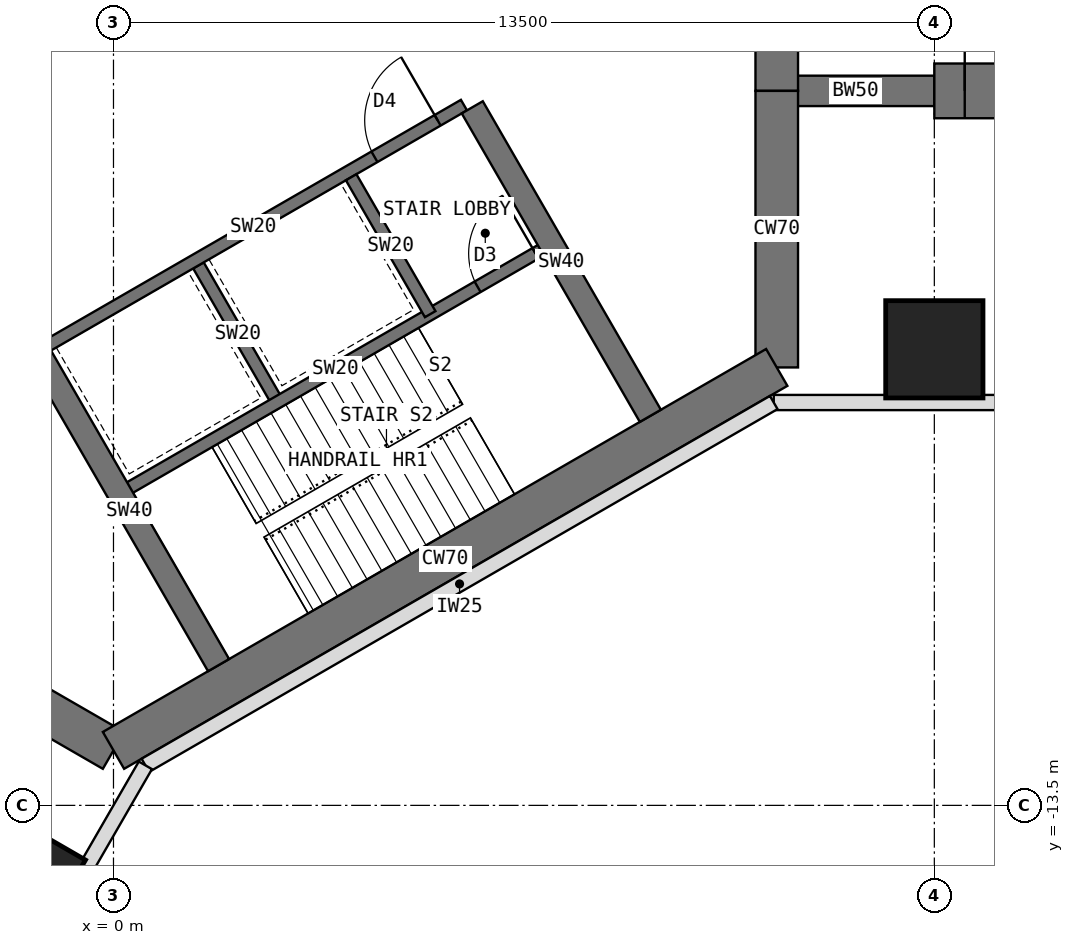
"""IFC4 building model, lengths in metres.
Left out: names, types, materials, properties, quantities, classifications, styles, units other than length and angle.
Written with IfcOpenShell. Run it as: python <this file> out.ifc"""

import sys

from ifc_helpers import new_model, si_unit, direction, frame, frame_2d, origin, origin_2d, place, context, subcontext, project, spatial, rectangle, extrude, element, fill, save


model = new_model("IFC4")
c1 = context("Model", 3, precision=1e-05, world=origin(), true_north=direction((0.0, 1.0)))
c2 = subcontext(c1, "Body", "Model", "MODEL_VIEW")
j1 = project(units=[si_unit("LENGTHUNIT", "METRE"), si_unit("PLANEANGLEUNIT", "RADIAN")], contexts=[c1])
p1 = place(None, origin())
s1 = spatial("IfcSite", under=j1, at=p1, CompositionType="ELEMENT")
p2 = place(p1, origin())
s2 = spatial("IfcBuilding", under=s1, at=p2, CompositionType="ELEMENT")
p3 = place(p2, origin())
s3 = spatial("IfcBuildingStorey", under=s2, at=p3, CompositionType="ELEMENT", Elevation=0.0)
p4 = place(p3, frame((13.5, -13.5, 0.0), z_axis=(0.0, 0.0, 1.0), x_axis=(1.0, 0.0, 0.0)))
e1 = element("IfcColumn", 1, at=p4, inside=s3, PredefinedType="COLUMN", context=c2, shape_type="SweptSolid", body=[
    extrude(rectangle(XDim=1.5, YDim=1.5, at=origin_2d()), origin(), (0.0, 0.0, 1.0), 5.5),
])
p5 = place(p3, frame((10.908, -6.298, 0.0), z_axis=(0.0, 0.0, 1.0), x_axis=(0.0, 1.0, 0.0)))
e2 = element("IfcWall", 2, at=p5, inside=s3, PredefinedType="SHEAR", context=c2, shape_type="SweptSolid", body=[
    extrude(rectangle(XDim=4.548, YDim=0.7, at=frame_2d((2.274, 0.0))), origin(), (0.0, 0.0, 1.0), 5.5),
])
p6 = place(p3, frame((10.908, -1.75, 0.0), z_axis=(0.0, 0.0, 1.0), x_axis=(0.0, 1.0, 0.0)))
e3 = element("IfcWall", 3, at=p6, inside=s3, PredefinedType="SHEAR", context=c2, shape_type="SweptSolid", body=[
    extrude(rectangle(XDim=3.5, YDim=0.7, at=frame_2d((1.75, 0.0))), origin(), (0.0, 0.0, 1.0), 5.5),
])
p7 = place(p6, frame((0.85, 0.0, 0.0)))
e4 = element("IfcOpeningElement", 4, at=p7, cuts=e3, PredefinedType="OPENING", context=c2, shape_type="SweptSolid", body=[
    extrude(rectangle(XDim=1.8, YDim=2.1, at=frame_2d((0.9, 1.05))), frame((0.0, 0.36, 0.0), z_axis=(0.0, -1.0, 0.0), x_axis=(1.0, 0.0, 0.0)), (0.0, 0.0, 1.0), 0.72),
])
p8 = place(p3, frame((-3.939, -10.322, 0.0), z_axis=(0.0, 0.0, 1.0), x_axis=(0.866011268655, -0.500024481964, 0.0)))
e5 = element("IfcWall", 5, at=p8, inside=s3, PredefinedType="SHEAR", context=c2, shape_type="SweptSolid", body=[
    extrude(rectangle(XDim=4.548, YDim=0.7, at=frame_2d((2.274, 0.0))), origin(), (0.0, 0.0, 1.0), 5.5),
])
p9 = place(p3, frame((0.0, -12.596, 0.0), z_axis=(0.0, 0.0, 1.0), x_axis=(0.866021940709, 0.500005998175, 0.0)))
e6 = element("IfcWall", 6, at=p9, inside=s3, PredefinedType="SHEAR", context=c2, shape_type="SweptSolid", body=[
    extrude(rectangle(XDim=12.596, YDim=0.7, at=frame_2d((6.298, 0.0))), origin(), (0.0, 0.0, 1.0), 5.5),
])
p10 = place(p3, frame((10.908, -1.75, 0.0), z_axis=(0.0, 0.0, 1.0), x_axis=(1.0, 0.0, 0.0)))
e7 = element("IfcWall", 7, at=p10, inside=s3, PredefinedType="SHEAR", context=c2, shape_type="SweptSolid", body=[
    extrude(rectangle(XDim=2.592, YDim=0.5, at=frame_2d((1.296, 0.0))), origin(), (0.0, 0.0, 1.0), 5.5),
])
p11 = place(p3, frame((13.5, -1.75, 0.0), z_axis=(0.0, 0.0, 1.0), x_axis=(1.0, 0.0, 0.0)))
e8 = element("IfcWall", 8, at=p11, inside=s3, PredefinedType="SHEAR", context=c2, shape_type="SweptSolid", body=[
    extrude(rectangle(XDim=13.2, YDim=0.9, at=frame_2d((6.6, 0.0))), origin(), (0.0, 0.0, 1.0), 5.5),
])
p12 = place(p11, frame((0.5, 0.0, 0.0)))
e9 = element("IfcOpeningElement", 9, at=p12, cuts=e8, PredefinedType="OPENING", context=c2, shape_type="SweptSolid", body=[
    extrude(rectangle(XDim=1.0, YDim=2.1, at=frame_2d((0.5, 1.05))), frame((0.0, 0.46, 0.0), z_axis=(0.0, -1.0, 0.0), x_axis=(1.0, 0.0, 0.0)), (0.0, 0.0, 1.0), 0.92),
])
for number, where, z_axis, x_axis in (
    (10, (13.5, -6.0, 0.0), (0.0, 0.0, 1.0), (1.0, 0.0, 0.0)),
    (11, (-1.554, -14.691, 0.0), (0.0, 0.0, 1.0), (0.5, 0.866, 0.0)),
):
    element("IfcColumn", number, at=place(p3, frame(where, z_axis=z_axis, x_axis=x_axis)), inside=s3, PredefinedType="COLUMN", context=c2, shape_type="SweptSolid", body=[
        extrude(rectangle(XDim=1.6, YDim=1.6, at=origin_2d()), origin(), (0.0, 0.0, 1.0), 5.5),
    ])
p13 = place(p3, frame((-1.164, -5.984, 0.0), z_axis=(0.0, 0.0, 1.0), x_axis=(0.866026010844, 0.49999894854, 0.0)))
e12 = element("IfcWall", 12, at=p13, inside=s3, PredefinedType="SHEAR", context=c2, shape_type="SweptSolid", body=[
    extrude(rectangle(XDim=8.0, YDim=0.2, at=frame_2d((4.0, 0.0))), origin(), (0.0, 0.0, 1.0), 5.5),
])
p14 = place(p13, frame((6.3, 0.0, 0.0)))
e13 = element("IfcOpeningElement", 13, at=p14, cuts=e12, PredefinedType="OPENING", context=c2, shape_type="SweptSolid", body=[
    extrude(rectangle(XDim=1.2, YDim=2.1, at=frame_2d((0.6, 1.05))), frame((0.0, 0.11, 0.0), z_axis=(0.0, -1.0, 0.0), x_axis=(1.0, 0.0, 0.0)), (0.0, 0.0, 1.0), 0.22),
])
p15 = place(p3, frame((1.397, -4.62, 0.0), z_axis=(0.0, 0.0, 1.0), x_axis=(0.499936506574, -0.866062058628, 0.0)))
e14 = element("IfcWall", 14, at=p15, inside=s3, PredefinedType="SHEAR", context=c2, shape_type="SweptSolid", body=[
    extrude(rectangle(XDim=2.6, YDim=0.2, at=frame_2d((1.3, 0.0))), origin(), (0.0, 0.0, 1.0), 5.5),
])
p16 = place(p3, frame((3.909, -3.17, 0.0), z_axis=(0.0, 0.0, 1.0), x_axis=(0.49997716683, -0.86603858612, 0.0)))
e15 = element("IfcWall", 15, at=p16, inside=s3, PredefinedType="SHEAR", context=c2, shape_type="SweptSolid", body=[
    extrude(rectangle(XDim=2.6, YDim=0.2, at=frame_2d((1.3, 0.0))), origin(), (0.0, 0.0, 1.0), 5.5),
])
p17 = place(p3, frame((0.186, -8.322, 0.0), z_axis=(0.0, 0.0, 1.0), x_axis=(0.866026010844, 0.49999894854, 0.0)))
e16 = element("IfcWall", 16, at=p17, inside=s3, PredefinedType="SHEAR", context=c2, shape_type="SweptSolid", body=[
    extrude(rectangle(XDim=8.0, YDim=0.2, at=frame_2d((4.0, 0.0))), origin(), (0.0, 0.0, 1.0), 5.5),
])
p18 = place(p17, frame((6.7, 0.0, 0.0)))
e17 = element("IfcOpeningElement", 17, at=p18, cuts=e16, PredefinedType="OPENING", context=c2, shape_type="SweptSolid", body=[
    extrude(rectangle(XDim=1.1, YDim=2.1, at=frame_2d((0.55, 1.05))), frame((0.0, 0.11, 0.0), z_axis=(0.0, -1.0, 0.0), x_axis=(1.0, 0.0, 0.0)), (0.0, 0.0, 1.0), 0.22),
])
for number, where, z_axis, x_axis in (
    (18, (5.901, -2.02, 0.0), (0.0, 0.0, 1.0), (0.5, -0.866, 0.0)),
    (19, (-1.201, -6.12, 0.0), (0.0, 0.0, 1.0), (0.5, -0.866, 0.0)),
):
    element("IfcWall", number, at=place(p3, frame(where, z_axis=z_axis, x_axis=x_axis)), inside=s3, PredefinedType="SHEAR", context=c2, shape_type="SweptSolid", body=[
        extrude(rectangle(XDim=5.858, YDim=0.4, at=frame_2d((2.929, 0.0))), origin(), (0.0, 0.0, 1.0), 5.5),
    ])
p19 = place(p3, frame((0.0, -14.1, 0.0), z_axis=(0.0, 0.0, 1.0), x_axis=(0.0, -1.0, 0.0)))
e20 = element("IfcWall", 20, at=p19, inside=s3, PredefinedType="PARTITIONING", context=c2, shape_type="SweptSolid", body=[
    extrude(rectangle(XDim=12.9, YDim=0.2, at=frame_2d((6.45, 0.0))), origin(), (0.0, 0.0, 1.0), 5.15),
])
p20 = place(p19, frame((0.55, 0.0, 0.0)))
e21 = element("IfcOpeningElement", 21, at=p20, cuts=e20, PredefinedType="OPENING", context=c2, shape_type="SweptSolid", body=[
    extrude(rectangle(XDim=1.8, YDim=2.4, at=frame_2d((0.9, 1.2))), frame((0.0, 0.11, 0.0), z_axis=(0.0, -1.0, 0.0), x_axis=(1.0, 0.0, 0.0)), (0.0, 0.0, 1.0), 0.22),
])
p21 = place(p3, frame((0.346, -13.5, 0.0), z_axis=(0.0, 0.0, 1.0), x_axis=(1.0, 0.0, 0.0)))
e22 = element("IfcWall", 22, at=p21, inside=s3, PredefinedType="PARTITIONING", context=c2, shape_type="SweptSolid", body=[
    extrude(rectangle(XDim=13.154, YDim=0.2, at=frame_2d((6.577, 0.0))), origin(), (0.0, 0.0, 1.0), 5.15),
])
p22 = place(p21, frame((5.677, 0.0, 0.0)))
e23 = element("IfcOpeningElement", 23, at=p22, cuts=e22, PredefinedType="OPENING", context=c2, shape_type="SweptSolid", body=[
    extrude(rectangle(XDim=1.8, YDim=2.4, at=frame_2d((0.9, 1.2))), frame((0.0, 0.11, 0.0), z_axis=(0.0, -1.0, 0.0), x_axis=(1.0, 0.0, 0.0)), (0.0, 0.0, 1.0), 0.22),
])
p23 = place(p3, frame((13.5, -13.5, 0.0), z_axis=(0.0, 0.0, 1.0), x_axis=(0.0, 1.0, 0.0)))
e24 = element("IfcWall", 24, at=p23, inside=s3, PredefinedType="PARTITIONING", context=c2, shape_type="SweptSolid", body=[
    extrude(rectangle(XDim=6.45, YDim=0.2, at=frame_2d((3.225, 0.0))), origin(), (0.0, 0.0, 1.0), 5.15),
])
p24 = place(p3, frame((13.5, -13.5, 0.0), z_axis=(0.0, 0.0, 1.0), x_axis=(1.0, 0.0, 0.0)))
e25 = element("IfcWall", 25, at=p24, inside=s3, PredefinedType="PARTITIONING", context=c2, shape_type="SweptSolid", body=[
    extrude(rectangle(XDim=13.5, YDim=0.2, at=frame_2d((6.75, 0.0))), origin(), (0.0, 0.0, 1.0), 3.75),
])
p25 = place(p24, frame((5.85, 0.0, 0.0)))
e26 = element("IfcOpeningElement", 26, at=p25, cuts=e25, PredefinedType="OPENING", context=c2, shape_type="SweptSolid", body=[
    extrude(rectangle(XDim=1.8, YDim=2.4, at=frame_2d((0.9, 1.2))), frame((0.0, 0.11, 0.0), z_axis=(0.0, -1.0, 0.0), x_axis=(1.0, 0.0, 0.0)), (0.0, 0.0, 1.0), 0.22),
])
p26 = place(p3, frame((24.875, -6.875, 0.0), z_axis=(0.0, 0.0, 1.0), x_axis=(-1.0, 0.0, 0.0)))
e27 = element("IfcWall", 27, at=p26, inside=s3, PredefinedType="STANDARD", context=c2, shape_type="SweptSolid", body=[
    extrude(rectangle(XDim=14.016, YDim=0.25, at=frame_2d((7.008, 0.0))), origin(), (0.0, 0.0, 1.0), 5.15),
])
p27 = place(p3, frame((10.859, -6.875, 0.0), z_axis=(0.0, 0.0, 1.0), x_axis=(-0.866027502425, -0.499996365031, 0.0)))
e28 = element("IfcWall", 28, at=p27, inside=s3, PredefinedType="STANDARD", context=c2, shape_type="SweptSolid", body=[
    extrude(rectangle(XDim=11.933, YDim=0.25, at=frame_2d((5.967, 0.0))), origin(), (0.0, 0.0, 1.0), 5.15),
])
p28 = place(p3, frame((0.524, -12.842, 0.0), z_axis=(0.0, 0.0, 1.0), x_axis=(-0.499996367808, -0.866027500821, 0.0)))
e29 = element("IfcWall", 29, at=p28, inside=s3, PredefinedType="STANDARD", context=c2, shape_type="SweptSolid", body=[
    extrude(rectangle(XDim=14.016, YDim=0.25, at=frame_2d((7.008, 0.0))), origin(), (0.0, 0.0, 1.0), 5.15),
])
p29 = place(p14, origin())
e30 = element("IfcDoor", 30, at=p29, inside=s3, OperationType="SINGLE_SWING_RIGHT", PredefinedType="DOOR", context=c2, shape_type="SweptSolid", body=[
    extrude(rectangle(XDim=1.2, YDim=2.1, at=frame_2d((0.6, 1.05))), frame((0.0, 0.025, 0.0), z_axis=(0.0, -1.0, 0.0), x_axis=(1.0, 0.0, 0.0)), (0.0, 0.0, 1.0), 0.05),
])
fill(e13, e30)
p30 = place(p18, origin())
e31 = element("IfcDoor", 31, at=p30, inside=s3, OperationType="SINGLE_SWING_RIGHT", PredefinedType="DOOR", context=c2, shape_type="SweptSolid", body=[
    extrude(rectangle(XDim=1.1, YDim=2.1, at=frame_2d((0.55, 1.05))), frame((0.0, 0.025, 0.0), z_axis=(0.0, -1.0, 0.0), x_axis=(1.0, 0.0, 0.0)), (0.0, 0.0, 1.0), 0.05),
])
fill(e17, e31)
p31 = place(p12, origin())
e32 = element("IfcDoor", 32, at=p31, inside=s3, OperationType="SINGLE_SWING_LEFT", PredefinedType="DOOR", context=c2, shape_type="SweptSolid", body=[
    extrude(rectangle(XDim=0.92, YDim=2.06, at=frame_2d((0.5, 1.03))), frame((0.0, 0.025, 0.0), z_axis=(0.0, -1.0, 0.0), x_axis=(1.0, 0.0, 0.0)), (0.0, 0.0, 1.0), 0.05),
    extrude(rectangle(XDim=0.04, YDim=2.1, at=frame_2d((0.02, 1.05))), frame((0.0, 0.45, 0.0), z_axis=(0.0, -1.0, 0.0), x_axis=(1.0, 0.0, 0.0)), (0.0, 0.0, 1.0), 0.899),
    extrude(rectangle(XDim=0.04, YDim=2.1, at=frame_2d((0.98, 1.05))), frame((0.0, 0.45, 0.0), z_axis=(0.0, -1.0, 0.0), x_axis=(1.0, 0.0, 0.0)), (0.0, 0.0, 1.0), 0.899),
    extrude(rectangle(XDim=0.92, YDim=0.04, at=frame_2d((0.5, 2.08))), frame((0.0, 0.45, 0.0), z_axis=(0.0, -1.0, 0.0), x_axis=(1.0, 0.0, 0.0)), (0.0, 0.0, 1.0), 0.899),
])
fill(e9, e32)
p32 = place(p22, origin())
e33 = element("IfcDoor", 33, at=p32, inside=s3, OperationType="DOUBLE_DOOR_DOUBLE_SWING", PredefinedType="DOOR", context=c2, shape_type="SweptSolid", body=[
    extrude(rectangle(XDim=1.8, YDim=2.4, at=frame_2d((0.9, 1.2))), frame((0.0, 0.025, 0.0), z_axis=(0.0, -1.0, 0.0), x_axis=(1.0, 0.0, 0.0)), (0.0, 0.0, 1.0), 0.05),
])
fill(e23, e33)
save(model, sys.argv[1])
